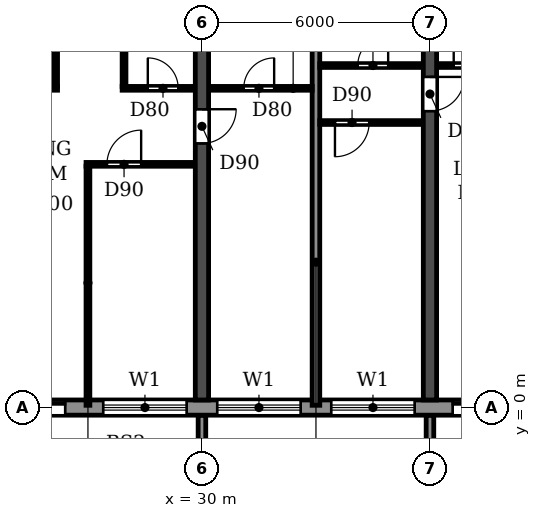
"""IFC4 building model, lengths in metres.
Left out: names, types, materials, properties, quantities, classifications, styles, units other than length and angle.
Written with IfcOpenShell. Run it as: python <this file> out.ifc"""

import sys

from ifc_helpers import new_model, si_unit, direction, frame, frame_2d, origin, place, context, subcontext, project, spatial, polyline, rectangle, outline, extrude, source, transform, mapped, element, fill, save


model = new_model("IFC4")
c1 = context("Model", 3, precision=1e-05, world=origin(), true_north=direction((0.0, 1.0)))
c2 = subcontext(c1, "Body", "Model", "MODEL_VIEW")
j1 = project(units=[si_unit("LENGTHUNIT", "METRE"), si_unit("PLANEANGLEUNIT", "RADIAN")], contexts=[c1])
p1 = place(None, origin())
s1 = spatial("IfcSite", under=j1, at=p1, CompositionType="ELEMENT")
p2 = place(p1, origin())
s2 = spatial("IfcBuilding", under=s1, at=p2, CompositionType="ELEMENT")
p3 = place(p2, frame((0.0, 0.0, 82.8)))
s3 = spatial("IfcBuildingStorey", under=s2, at=p3, CompositionType="ELEMENT", Elevation=82.8)
p4 = place(p3, frame((30.0, 0.2, 0.0), z_axis=(0.0, 0.0, 1.0), x_axis=(0.0, 1.0, 0.0)))
e1 = element("IfcWall", 1, at=p4, inside=s3, PredefinedType="SHEAR", context=c2, shape_type="SweptSolid", body=[
    extrude(rectangle(XDim=11.675, YDim=0.35, at=frame_2d((5.837, 0.0))), origin(), (0.0, 0.0, 1.0), 3.06),
])
p5 = place(p4, frame((6.75, 0.0, 0.0)))
e2 = element("IfcOpeningElement", 2, at=p5, cuts=e1, PredefinedType="OPENING", context=c2, shape_type="SweptSolid", body=[
    extrude(rectangle(XDim=0.9, YDim=2.1, at=frame_2d((0.45, 1.05))), frame((0.0, 0.185, 0.0), z_axis=(0.0, -1.0, 0.0), x_axis=(1.0, 0.0, 0.0)), (0.0, 0.0, 1.0), 0.37),
])
p6 = place(p3, frame((36.0, 0.2, 0.0), z_axis=(0.0, 0.0, 1.0), x_axis=(0.0, 1.0, 0.0)))
e3 = element("IfcWall", 3, at=p6, inside=s3, PredefinedType="SHEAR", context=c2, shape_type="SweptSolid", body=[
    extrude(rectangle(XDim=11.675, YDim=0.35, at=frame_2d((5.837, 0.0))), origin(), (0.0, 0.0, 1.0), 3.06),
])
p7 = place(p6, frame((7.6, 0.0, 0.0)))
e4 = element("IfcOpeningElement", 4, at=p7, cuts=e3, PredefinedType="OPENING", context=c2, shape_type="SweptSolid", body=[
    extrude(rectangle(XDim=0.9, YDim=2.1, at=frame_2d((0.45, 1.05))), frame((0.0, 0.185, 0.0), z_axis=(0.0, -1.0, 0.0), x_axis=(1.0, 0.0, 0.0)), (0.0, 0.0, 1.0), 0.37),
])
p8 = place(p3, frame((10.683, 0.0, 0.0), z_axis=(0.0, 0.0, 1.0), x_axis=(1.0, 0.0, 0.0)))
e5 = element("IfcWall", 5, at=p8, inside=s3, PredefinedType="STANDARD", context=c2, shape_type="SweptSolid", body=[
    extrude(rectangle(XDim=80.634, YDim=0.4, at=frame_2d((40.317, 0.0))), origin(), (0.0, 0.0, 1.0), 3.06),
])
p9 = place(p8, frame((1.717, 0.0, 0.9)))
e6 = element("IfcOpeningElement", 6, at=p9, cuts=e5, PredefinedType="OPENING", context=c2, shape_type="SweptSolid", body=[
    extrude(rectangle(XDim=2.2, YDim=1.5, at=frame_2d((1.1, 0.75))), frame((0.0, 0.21, 0.0), z_axis=(0.0, -1.0, 0.0), x_axis=(1.0, 0.0, 0.0)), (0.0, 0.0, 1.0), 0.42),
])
p10 = place(p8, frame((4.917, 0.0, 0.0)))
e7 = element("IfcOpeningElement", 7, at=p10, cuts=e5, PredefinedType="OPENING", context=c2, shape_type="SweptSolid", body=[
    extrude(rectangle(XDim=1.8, YDim=2.4, at=frame_2d((0.9, 1.2))), frame((0.0, 0.21, 0.0), z_axis=(0.0, -1.0, 0.0), x_axis=(1.0, 0.0, 0.0)), (0.0, 0.0, 1.0), 0.42),
])
p11 = place(p8, frame((7.717, 0.0, 0.9)))
e8 = element("IfcOpeningElement", 8, at=p11, cuts=e5, PredefinedType="OPENING", context=c2, shape_type="SweptSolid", body=[
    extrude(rectangle(XDim=2.2, YDim=1.5, at=frame_2d((1.1, 0.75))), frame((0.0, 0.21, 0.0), z_axis=(0.0, -1.0, 0.0), x_axis=(1.0, 0.0, 0.0)), (0.0, 0.0, 1.0), 0.42),
])
p12 = place(p8, frame((10.717, 0.0, 0.9)))
e9 = element("IfcOpeningElement", 9, at=p12, cuts=e5, PredefinedType="OPENING", context=c2, shape_type="SweptSolid", body=[
    extrude(rectangle(XDim=2.2, YDim=1.5, at=frame_2d((1.1, 0.75))), frame((0.0, 0.21, 0.0), z_axis=(0.0, -1.0, 0.0), x_axis=(1.0, 0.0, 0.0)), (0.0, 0.0, 1.0), 0.42),
])
p13 = place(p8, frame((13.917, 0.0, 0.0)))
e10 = element("IfcOpeningElement", 10, at=p13, cuts=e5, PredefinedType="OPENING", context=c2, shape_type="SweptSolid", body=[
    extrude(rectangle(XDim=1.8, YDim=2.4, at=frame_2d((0.9, 1.2))), frame((0.0, 0.21, 0.0), z_axis=(0.0, -1.0, 0.0), x_axis=(1.0, 0.0, 0.0)), (0.0, 0.0, 1.0), 0.42),
])
p14 = place(p8, frame((16.717, 0.0, 0.9)))
e11 = element("IfcOpeningElement", 11, at=p14, cuts=e5, PredefinedType="OPENING", context=c2, shape_type="SweptSolid", body=[
    extrude(rectangle(XDim=2.2, YDim=1.5, at=frame_2d((1.1, 0.75))), frame((0.0, 0.21, 0.0), z_axis=(0.0, -1.0, 0.0), x_axis=(1.0, 0.0, 0.0)), (0.0, 0.0, 1.0), 0.42),
])
p15 = place(p8, frame((19.717, 0.0, 0.9)))
e12 = element("IfcOpeningElement", 12, at=p15, cuts=e5, PredefinedType="OPENING", context=c2, shape_type="SweptSolid", body=[
    extrude(rectangle(XDim=2.2, YDim=1.5, at=frame_2d((1.1, 0.75))), frame((0.0, 0.21, 0.0), z_axis=(0.0, -1.0, 0.0), x_axis=(1.0, 0.0, 0.0)), (0.0, 0.0, 1.0), 0.42),
])
p16 = place(p8, frame((22.717, 0.0, 0.9)))
e13 = element("IfcOpeningElement", 13, at=p16, cuts=e5, PredefinedType="OPENING", context=c2, shape_type="SweptSolid", body=[
    extrude(rectangle(XDim=2.2, YDim=1.5, at=frame_2d((1.1, 0.75))), frame((0.0, 0.21, 0.0), z_axis=(0.0, -1.0, 0.0), x_axis=(1.0, 0.0, 0.0)), (0.0, 0.0, 1.0), 0.42),
])
p17 = place(p8, frame((25.917, 0.0, 0.0)))
e14 = element("IfcOpeningElement", 14, at=p17, cuts=e5, PredefinedType="OPENING", context=c2, shape_type="SweptSolid", body=[
    extrude(rectangle(XDim=1.8, YDim=2.4, at=frame_2d((0.9, 1.2))), frame((0.0, 0.21, 0.0), z_axis=(0.0, -1.0, 0.0), x_axis=(1.0, 0.0, 0.0)), (0.0, 0.0, 1.0), 0.42),
])
p18 = place(p8, frame((28.717, 0.0, 0.9)))
e15 = element("IfcOpeningElement", 15, at=p18, cuts=e5, PredefinedType="OPENING", context=c2, shape_type="SweptSolid", body=[
    extrude(rectangle(XDim=2.2, YDim=1.5, at=frame_2d((1.1, 0.75))), frame((0.0, 0.21, 0.0), z_axis=(0.0, -1.0, 0.0), x_axis=(1.0, 0.0, 0.0)), (0.0, 0.0, 1.0), 0.42),
])
p19 = place(p8, frame((31.717, 0.0, 0.9)))
e16 = element("IfcOpeningElement", 16, at=p19, cuts=e5, PredefinedType="OPENING", context=c2, shape_type="SweptSolid", body=[
    extrude(rectangle(XDim=2.2, YDim=1.5, at=frame_2d((1.1, 0.75))), frame((0.0, 0.21, 0.0), z_axis=(0.0, -1.0, 0.0), x_axis=(1.0, 0.0, 0.0)), (0.0, 0.0, 1.0), 0.42),
])
p20 = place(p8, frame((34.717, 0.0, 0.9)))
e17 = element("IfcOpeningElement", 17, at=p20, cuts=e5, PredefinedType="OPENING", context=c2, shape_type="SweptSolid", body=[
    extrude(rectangle(XDim=2.2, YDim=1.5, at=frame_2d((1.1, 0.75))), frame((0.0, 0.21, 0.0), z_axis=(0.0, -1.0, 0.0), x_axis=(1.0, 0.0, 0.0)), (0.0, 0.0, 1.0), 0.42),
])
p21 = place(p8, frame((37.717, 0.0, 0.9)))
e18 = element("IfcOpeningElement", 18, at=p21, cuts=e5, PredefinedType="OPENING", context=c2, shape_type="SweptSolid", body=[
    extrude(rectangle(XDim=2.2, YDim=1.5, at=frame_2d((1.1, 0.75))), frame((0.0, 0.21, 0.0), z_axis=(0.0, -1.0, 0.0), x_axis=(1.0, 0.0, 0.0)), (0.0, 0.0, 1.0), 0.42),
])
p22 = place(p8, frame((40.917, 0.0, 0.0)))
e19 = element("IfcOpeningElement", 19, at=p22, cuts=e5, PredefinedType="OPENING", context=c2, shape_type="SweptSolid", body=[
    extrude(rectangle(XDim=1.8, YDim=2.4, at=frame_2d((0.9, 1.2))), frame((0.0, 0.21, 0.0), z_axis=(0.0, -1.0, 0.0), x_axis=(1.0, 0.0, 0.0)), (0.0, 0.0, 1.0), 0.42),
])
p23 = place(p8, frame((43.717, 0.0, 0.9)))
e20 = element("IfcOpeningElement", 20, at=p23, cuts=e5, PredefinedType="OPENING", context=c2, shape_type="SweptSolid", body=[
    extrude(rectangle(XDim=2.2, YDim=1.5, at=frame_2d((1.1, 0.75))), frame((0.0, 0.21, 0.0), z_axis=(0.0, -1.0, 0.0), x_axis=(1.0, 0.0, 0.0)), (0.0, 0.0, 1.0), 0.42),
])
p24 = place(p8, frame((46.717, 0.0, 0.9)))
e21 = element("IfcOpeningElement", 21, at=p24, cuts=e5, PredefinedType="OPENING", context=c2, shape_type="SweptSolid", body=[
    extrude(rectangle(XDim=2.2, YDim=1.5, at=frame_2d((1.1, 0.75))), frame((0.0, 0.21, 0.0), z_axis=(0.0, -1.0, 0.0), x_axis=(1.0, 0.0, 0.0)), (0.0, 0.0, 1.0), 0.42),
])
p25 = place(p8, frame((49.717, 0.0, 0.9)))
e22 = element("IfcOpeningElement", 22, at=p25, cuts=e5, PredefinedType="OPENING", context=c2, shape_type="SweptSolid", body=[
    extrude(rectangle(XDim=2.2, YDim=1.5, at=frame_2d((1.1, 0.75))), frame((0.0, 0.21, 0.0), z_axis=(0.0, -1.0, 0.0), x_axis=(1.0, 0.0, 0.0)), (0.0, 0.0, 1.0), 0.42),
])
p26 = place(p8, frame((52.917, 0.0, 0.0)))
e23 = element("IfcOpeningElement", 23, at=p26, cuts=e5, PredefinedType="OPENING", context=c2, shape_type="SweptSolid", body=[
    extrude(rectangle(XDim=1.8, YDim=2.4, at=frame_2d((0.9, 1.2))), frame((0.0, 0.21, 0.0), z_axis=(0.0, -1.0, 0.0), x_axis=(1.0, 0.0, 0.0)), (0.0, 0.0, 1.0), 0.42),
])
p27 = place(p8, frame((55.717, 0.0, 0.9)))
e24 = element("IfcOpeningElement", 24, at=p27, cuts=e5, PredefinedType="OPENING", context=c2, shape_type="SweptSolid", body=[
    extrude(rectangle(XDim=2.2, YDim=1.5, at=frame_2d((1.1, 0.75))), frame((0.0, 0.21, 0.0), z_axis=(0.0, -1.0, 0.0), x_axis=(1.0, 0.0, 0.0)), (0.0, 0.0, 1.0), 0.42),
])
p28 = place(p8, frame((58.717, 0.0, 0.9)))
e25 = element("IfcOpeningElement", 25, at=p28, cuts=e5, PredefinedType="OPENING", context=c2, shape_type="SweptSolid", body=[
    extrude(rectangle(XDim=2.2, YDim=1.5, at=frame_2d((1.1, 0.75))), frame((0.0, 0.21, 0.0), z_axis=(0.0, -1.0, 0.0), x_axis=(1.0, 0.0, 0.0)), (0.0, 0.0, 1.0), 0.42),
])
p29 = place(p8, frame((61.717, 0.0, 0.9)))
e26 = element("IfcOpeningElement", 26, at=p29, cuts=e5, PredefinedType="OPENING", context=c2, shape_type="SweptSolid", body=[
    extrude(rectangle(XDim=2.2, YDim=1.5, at=frame_2d((1.1, 0.75))), frame((0.0, 0.21, 0.0), z_axis=(0.0, -1.0, 0.0), x_axis=(1.0, 0.0, 0.0)), (0.0, 0.0, 1.0), 0.42),
])
p30 = place(p8, frame((64.917, 0.0, 0.0)))
e27 = element("IfcOpeningElement", 27, at=p30, cuts=e5, PredefinedType="OPENING", context=c2, shape_type="SweptSolid", body=[
    extrude(rectangle(XDim=1.8, YDim=2.4, at=frame_2d((0.9, 1.2))), frame((0.0, 0.21, 0.0), z_axis=(0.0, -1.0, 0.0), x_axis=(1.0, 0.0, 0.0)), (0.0, 0.0, 1.0), 0.42),
])
p31 = place(p8, frame((67.717, 0.0, 0.9)))
e28 = element("IfcOpeningElement", 28, at=p31, cuts=e5, PredefinedType="OPENING", context=c2, shape_type="SweptSolid", body=[
    extrude(rectangle(XDim=2.2, YDim=1.5, at=frame_2d((1.1, 0.75))), frame((0.0, 0.21, 0.0), z_axis=(0.0, -1.0, 0.0), x_axis=(1.0, 0.0, 0.0)), (0.0, 0.0, 1.0), 0.42),
])
p32 = place(p8, frame((70.717, 0.0, 0.9)))
e29 = element("IfcOpeningElement", 29, at=p32, cuts=e5, PredefinedType="OPENING", context=c2, shape_type="SweptSolid", body=[
    extrude(rectangle(XDim=2.2, YDim=1.5, at=frame_2d((1.1, 0.75))), frame((0.0, 0.21, 0.0), z_axis=(0.0, -1.0, 0.0), x_axis=(1.0, 0.0, 0.0)), (0.0, 0.0, 1.0), 0.42),
])
p33 = place(p8, frame((73.917, 0.0, 0.0)))
e30 = element("IfcOpeningElement", 30, at=p33, cuts=e5, PredefinedType="OPENING", context=c2, shape_type="SweptSolid", body=[
    extrude(rectangle(XDim=1.8, YDim=2.4, at=frame_2d((0.9, 1.2))), frame((0.0, 0.21, 0.0), z_axis=(0.0, -1.0, 0.0), x_axis=(1.0, 0.0, 0.0)), (0.0, 0.0, 1.0), 0.42),
])
p34 = place(p8, frame((76.717, 0.0, 0.9)))
e31 = element("IfcOpeningElement", 31, at=p34, cuts=e5, PredefinedType="OPENING", context=c2, shape_type="SweptSolid", body=[
    extrude(rectangle(XDim=2.2, YDim=1.5, at=frame_2d((1.1, 0.75))), frame((0.0, 0.21, 0.0), z_axis=(0.0, -1.0, 0.0), x_axis=(1.0, 0.0, 0.0)), (0.0, 0.0, 1.0), 0.42),
])
m1 = source(origin(), c2, "Body", "SweptSolid", [
    extrude(outline(polyline([(0.0, 0.0), (0.2, 0.0), (0.2, 1.65), (0.0, 1.65), (0.0, 0.0)])), origin(), (0.0, 0.0, 1.0), 3.1),
])
for number, where in (
    (32, (29.9, -1.85, 0.0)),
    (33, (35.9, -1.85, 0.0)),
):
    element("IfcWall", number, at=place(p3, frame(where)), inside=s3, PredefinedType="STANDARD", context=c2, shape_type="MappedRepresentation", body=[
        mapped(m1, transform((0.0, 0.0, 0.0))),
    ])
p35 = place(p3, frame((33.0, 0.06, 0.0), z_axis=(0.0, 0.0, 1.0), x_axis=(0.0, 1.0, 0.0)))
e34 = element("IfcWall", 34, at=p35, inside=s3, PredefinedType="PARTITIONING", context=c2, shape_type="SweptSolid", body=[
    extrude(rectangle(XDim=11.805, YDim=0.2, at=frame_2d((5.902, 0.0))), origin(), (0.0, 0.0, 1.0), 3.06),
])
p36 = place(p3, frame((26.95, 6.4, 0.0), z_axis=(0.0, 0.0, 1.0), x_axis=(1.0, 0.0, 0.0)))
e35 = element("IfcWall", 35, at=p36, inside=s3, PredefinedType="PARTITIONING", context=c2, shape_type="SweptSolid", body=[
    extrude(rectangle(XDim=2.865, YDim=0.1, at=frame_2d((1.433, 0.0))), origin(), (0.0, 0.0, 1.0), 3.06),
])
p37 = place(p36, frame((0.55, 0.0, 0.0)))
e36 = element("IfcOpeningElement", 36, at=p37, cuts=e35, PredefinedType="OPENING", context=c2, shape_type="SweptSolid", body=[
    extrude(rectangle(XDim=0.9, YDim=2.1, at=frame_2d((0.45, 1.05))), frame((0.0, 0.06, 0.0), z_axis=(0.0, -1.0, 0.0), x_axis=(1.0, 0.0, 0.0)), (0.0, 0.0, 1.0), 0.12),
])
p38 = place(p3, frame((33.1, 7.5, 0.0), z_axis=(0.0, 0.0, 1.0), x_axis=(1.0, 0.0, 0.0)))
e37 = element("IfcWall", 37, at=p38, inside=s3, PredefinedType="PARTITIONING", context=c2, shape_type="SweptSolid", body=[
    extrude(rectangle(XDim=2.715, YDim=0.1, at=frame_2d((1.357, 0.0))), origin(), (0.0, 0.0, 1.0), 3.06),
])
p39 = place(p38, frame((0.4, 0.0, 0.0)))
e38 = element("IfcOpeningElement", 38, at=p39, cuts=e37, PredefinedType="OPENING", context=c2, shape_type="SweptSolid", body=[
    extrude(rectangle(XDim=0.9, YDim=2.1, at=frame_2d((0.45, 1.05))), frame((0.0, 0.06, 0.0), z_axis=(0.0, -1.0, 0.0), x_axis=(1.0, 0.0, 0.0)), (0.0, 0.0, 1.0), 0.12),
])
p40 = place(p3, frame((24.185, 8.4, 0.0), z_axis=(0.0, 0.0, 1.0), x_axis=(1.0, 0.0, 0.0)))
e39 = element("IfcWall", 39, at=p40, inside=s3, PredefinedType="PARTITIONING", context=c2, shape_type="SweptSolid", body=[
    extrude(rectangle(XDim=2.015, YDim=0.1, at=frame_2d((1.007, 0.0))), origin(), (0.0, 0.0, 1.0), 3.06),
])
p41 = place(p40, frame((0.44, 0.0, 0.0)))
e40 = element("IfcOpeningElement", 40, at=p41, cuts=e39, PredefinedType="OPENING", context=c2, shape_type="SweptSolid", body=[
    extrude(rectangle(XDim=0.9, YDim=2.1, at=frame_2d((0.45, 1.05))), frame((0.0, 0.06, 0.0), z_axis=(0.0, -1.0, 0.0), x_axis=(1.0, 0.0, 0.0)), (0.0, 0.0, 1.0), 0.12),
])
p42 = place(p3, frame((27.9, 8.4, 0.0), z_axis=(0.0, 0.0, 1.0), x_axis=(1.0, 0.0, 0.0)))
e41 = element("IfcWall", 41, at=p42, inside=s3, PredefinedType="PARTITIONING", context=c2, shape_type="SweptSolid", body=[
    extrude(rectangle(XDim=1.915, YDim=0.1, at=frame_2d((0.958, 0.0))), origin(), (0.0, 0.0, 1.0), 3.06),
])
p43 = place(p42, frame((0.675, 0.0, 0.0)))
e42 = element("IfcOpeningElement", 42, at=p43, cuts=e41, PredefinedType="OPENING", context=c2, shape_type="SweptSolid", body=[
    extrude(rectangle(XDim=0.8, YDim=2.1, at=frame_2d((0.4, 1.05))), frame((0.0, 0.06, 0.0), z_axis=(0.0, -1.0, 0.0), x_axis=(1.0, 0.0, 0.0)), (0.0, 0.0, 1.0), 0.12),
])
p44 = place(p3, frame((30.185, 8.4, 0.0), z_axis=(0.0, 0.0, 1.0), x_axis=(1.0, 0.0, 0.0)))
e43 = element("IfcWall", 43, at=p44, inside=s3, PredefinedType="PARTITIONING", context=c2, shape_type="SweptSolid", body=[
    extrude(rectangle(XDim=2.715, YDim=0.1, at=frame_2d((1.357, 0.0))), origin(), (0.0, 0.0, 1.0), 3.06),
])
p45 = place(p44, frame((0.915, 0.0, 0.0)))
e44 = element("IfcOpeningElement", 44, at=p45, cuts=e43, PredefinedType="OPENING", context=c2, shape_type="SweptSolid", body=[
    extrude(rectangle(XDim=0.8, YDim=2.1, at=frame_2d((0.4, 1.05))), frame((0.0, 0.06, 0.0), z_axis=(0.0, -1.0, 0.0), x_axis=(1.0, 0.0, 0.0)), (0.0, 0.0, 1.0), 0.12),
])
p46 = place(p3, frame((33.1, 9.0, 0.0), z_axis=(0.0, 0.0, 1.0), x_axis=(1.0, 0.0, 0.0)))
e45 = element("IfcWall", 45, at=p46, inside=s3, PredefinedType="PARTITIONING", context=c2, shape_type="SweptSolid", body=[
    extrude(rectangle(XDim=2.715, YDim=0.1, at=frame_2d((1.357, 0.0))), origin(), (0.0, 0.0, 1.0), 3.06),
])
p47 = place(p46, frame((1.0, 0.0, 0.0)))
e46 = element("IfcOpeningElement", 46, at=p47, cuts=e45, PredefinedType="OPENING", context=c2, shape_type="SweptSolid", body=[
    extrude(rectangle(XDim=0.8, YDim=2.1, at=frame_2d((0.4, 1.05))), frame((0.0, 0.06, 0.0), z_axis=(0.0, -1.0, 0.0), x_axis=(1.0, 0.0, 0.0)), (0.0, 0.0, 1.0), 0.12),
])
p48 = place(p3, frame((36.185, 9.0, 0.0), z_axis=(0.0, 0.0, 1.0), x_axis=(1.0, 0.0, 0.0)))
e47 = element("IfcWall", 47, at=p48, inside=s3, PredefinedType="PARTITIONING", context=c2, shape_type="SweptSolid", body=[
    extrude(rectangle(XDim=2.015, YDim=0.1, at=frame_2d((1.007, 0.0))), origin(), (0.0, 0.0, 1.0), 3.06),
])
p49 = place(p48, frame((0.44, 0.0, 0.0)))
e48 = element("IfcOpeningElement", 48, at=p49, cuts=e47, PredefinedType="OPENING", context=c2, shape_type="SweptSolid", body=[
    extrude(rectangle(XDim=0.9, YDim=2.1, at=frame_2d((0.45, 1.05))), frame((0.0, 0.06, 0.0), z_axis=(0.0, -1.0, 0.0), x_axis=(1.0, 0.0, 0.0)), (0.0, 0.0, 1.0), 0.12),
])
p50 = place(p3, frame((26.15, 8.45, 0.0), z_axis=(0.0, 0.0, 1.0), x_axis=(0.0, 1.0, 0.0)))
e49 = element("IfcWall", 49, at=p50, inside=s3, PredefinedType="PARTITIONING", context=c2, shape_type="SweptSolid", body=[
    extrude(rectangle(XDim=3.415, YDim=0.1, at=frame_2d((1.708, 0.0))), origin(), (0.0, 0.0, 1.0), 3.06),
])
p51 = place(p3, frame((27.0, 0.06, 0.0), z_axis=(0.0, 0.0, 1.0), x_axis=(0.0, 1.0, 0.0)))
e50 = element("IfcWall", 50, at=p51, inside=s3, PredefinedType="PARTITIONING", context=c2, shape_type="SweptSolid", body=[
    extrude(rectangle(XDim=6.29, YDim=0.1, at=frame_2d((3.145, 0.0))), origin(), (0.0, 0.0, 1.0), 3.06),
])
p52 = place(p3, frame((27.95, 8.45, 0.0), z_axis=(0.0, 0.0, 1.0), x_axis=(0.0, 1.0, 0.0)))
e51 = element("IfcWall", 51, at=p52, inside=s3, PredefinedType="PARTITIONING", context=c2, shape_type="SweptSolid", body=[
    extrude(rectangle(XDim=3.415, YDim=0.1, at=frame_2d((1.708, 0.0))), origin(), (0.0, 0.0, 1.0), 3.06),
])
p53 = place(p13, origin())
e52 = element("IfcDoor", 52, at=p53, inside=s3, OperationType="DOUBLE_DOOR_SLIDING", PredefinedType="DOOR", context=c2, shape_type="SweptSolid", body=[
    extrude(rectangle(XDim=1.8, YDim=2.4, at=frame_2d((0.9, 1.2))), frame((0.0, 0.025, 0.0), z_axis=(0.0, -1.0, 0.0), x_axis=(1.0, 0.0, 0.0)), (0.0, 0.0, 1.0), 0.05),
])
fill(e10, e52)
p54 = place(p14, origin())
e53 = element("IfcWindow", 53, at=p54, inside=s3, PartitioningType="DOUBLE_PANEL_HORIZONTAL", PredefinedType="WINDOW", context=c2, shape_type="SweptSolid", body=[
    extrude(rectangle(XDim=2.2, YDim=1.5, at=frame_2d((1.1, 0.75))), frame((0.0, 0.03, 0.0), z_axis=(0.0, -1.0, 0.0), x_axis=(1.0, 0.0, 0.0)), (0.0, 0.0, 1.0), 0.06),
])
fill(e11, e53)
p55 = place(p15, origin())
e54 = element("IfcWindow", 54, at=p55, inside=s3, PartitioningType="DOUBLE_PANEL_HORIZONTAL", PredefinedType="WINDOW", context=c2, shape_type="SweptSolid", body=[
    extrude(rectangle(XDim=2.2, YDim=1.5, at=frame_2d((1.1, 0.75))), frame((0.0, 0.03, 0.0), z_axis=(0.0, -1.0, 0.0), x_axis=(1.0, 0.0, 0.0)), (0.0, 0.0, 1.0), 0.06),
])
fill(e12, e54)
p56 = place(p16, origin())
e55 = element("IfcWindow", 55, at=p56, inside=s3, PartitioningType="DOUBLE_PANEL_HORIZONTAL", PredefinedType="WINDOW", context=c2, shape_type="SweptSolid", body=[
    extrude(rectangle(XDim=2.2, YDim=1.5, at=frame_2d((1.1, 0.75))), frame((0.0, 0.03, 0.0), z_axis=(0.0, -1.0, 0.0), x_axis=(1.0, 0.0, 0.0)), (0.0, 0.0, 1.0), 0.06),
])
fill(e13, e55)
p57 = place(p17, origin())
e56 = element("IfcDoor", 56, at=p57, inside=s3, OperationType="DOUBLE_DOOR_SLIDING", PredefinedType="DOOR", context=c2, shape_type="SweptSolid", body=[
    extrude(rectangle(XDim=1.8, YDim=2.4, at=frame_2d((0.9, 1.2))), frame((0.0, 0.025, 0.0), z_axis=(0.0, -1.0, 0.0), x_axis=(1.0, 0.0, 0.0)), (0.0, 0.0, 1.0), 0.05),
])
fill(e14, e56)
p58 = place(p45, origin())
e57 = element("IfcDoor", 57, at=p58, inside=s3, OperationType="SINGLE_SWING_RIGHT", PredefinedType="DOOR", context=c2, shape_type="SweptSolid", body=[
    extrude(rectangle(XDim=0.8, YDim=2.1, at=frame_2d((0.4, 1.05))), frame((0.0, 0.025, 0.0), z_axis=(0.0, -1.0, 0.0), x_axis=(1.0, 0.0, 0.0)), (0.0, 0.0, 1.0), 0.05),
])
fill(e44, e57)
p59 = place(p37, origin())
e58 = element("IfcDoor", 58, at=p59, inside=s3, OperationType="SINGLE_SWING_RIGHT", PredefinedType="DOOR", context=c2, shape_type="SweptSolid", body=[
    extrude(rectangle(XDim=0.9, YDim=2.1, at=frame_2d((0.45, 1.05))), frame((0.0, 0.025, 0.0), z_axis=(0.0, -1.0, 0.0), x_axis=(1.0, 0.0, 0.0)), (0.0, 0.0, 1.0), 0.05),
])
fill(e36, e58)
p60 = place(p43, origin())
e59 = element("IfcDoor", 59, at=p60, inside=s3, OperationType="SINGLE_SWING_LEFT", PredefinedType="DOOR", context=c2, shape_type="SweptSolid", body=[
    extrude(rectangle(XDim=0.8, YDim=2.1, at=frame_2d((0.4, 1.05))), frame((0.0, 0.025, 0.0), z_axis=(0.0, -1.0, 0.0), x_axis=(1.0, 0.0, 0.0)), (0.0, 0.0, 1.0), 0.05),
])
fill(e42, e59)
p61 = place(p5, frame((0.9, 0.0, 0.0), z_axis=(0.0, 0.0, 1.0), x_axis=(-1.0, 0.0, 0.0)))
e60 = element("IfcDoor", 60, at=p61, inside=s3, OperationType="SINGLE_SWING_LEFT", PredefinedType="DOOR", context=c2, shape_type="SweptSolid", body=[
    extrude(rectangle(XDim=0.9, YDim=2.1, at=frame_2d((0.45, 1.05))), frame((0.0, 0.025, 0.0), z_axis=(0.0, -1.0, 0.0), x_axis=(1.0, 0.0, 0.0)), (0.0, 0.0, 1.0), 0.05),
])
fill(e2, e60)
p62 = place(p39, frame((0.9, 0.0, 0.0), z_axis=(0.0, 0.0, 1.0), x_axis=(-1.0, 0.0, 0.0)))
e61 = element("IfcDoor", 61, at=p62, inside=s3, OperationType="SINGLE_SWING_RIGHT", PredefinedType="DOOR", context=c2, shape_type="SweptSolid", body=[
    extrude(rectangle(XDim=0.9, YDim=2.1, at=frame_2d((0.45, 1.05))), frame((0.0, 0.025, 0.0), z_axis=(0.0, -1.0, 0.0), x_axis=(1.0, 0.0, 0.0)), (0.0, 0.0, 1.0), 0.05),
])
fill(e38, e61)
p63 = place(p47, origin())
e62 = element("IfcDoor", 62, at=p63, inside=s3, OperationType="SINGLE_SWING_RIGHT", PredefinedType="DOOR", context=c2, shape_type="SweptSolid", body=[
    extrude(rectangle(XDim=0.8, YDim=2.1, at=frame_2d((0.4, 1.05))), frame((0.0, 0.025, 0.0), z_axis=(0.0, -1.0, 0.0), x_axis=(1.0, 0.0, 0.0)), (0.0, 0.0, 1.0), 0.05),
])
fill(e46, e62)
p64 = place(p7, frame((0.9, 0.0, 0.0), z_axis=(0.0, 0.0, 1.0), x_axis=(-1.0, 0.0, 0.0)))
e63 = element("IfcDoor", 63, at=p64, inside=s3, OperationType="SINGLE_SWING_LEFT", PredefinedType="DOOR", context=c2, shape_type="SweptSolid", body=[
    extrude(rectangle(XDim=0.9, YDim=2.1, at=frame_2d((0.45, 1.05))), frame((0.0, 0.025, 0.0), z_axis=(0.0, -1.0, 0.0), x_axis=(1.0, 0.0, 0.0)), (0.0, 0.0, 1.0), 0.05),
])
fill(e4, e63)
p65 = place(p49, origin())
e64 = element("IfcDoor", 64, at=p65, inside=s3, OperationType="SINGLE_SWING_LEFT", PredefinedType="DOOR", context=c2, shape_type="SweptSolid", body=[
    extrude(rectangle(XDim=0.9, YDim=2.1, at=frame_2d((0.45, 1.05))), frame((0.0, 0.025, 0.0), z_axis=(0.0, -1.0, 0.0), x_axis=(1.0, 0.0, 0.0)), (0.0, 0.0, 1.0), 0.05),
])
fill(e48, e64)
save(model, sys.argv[1])
